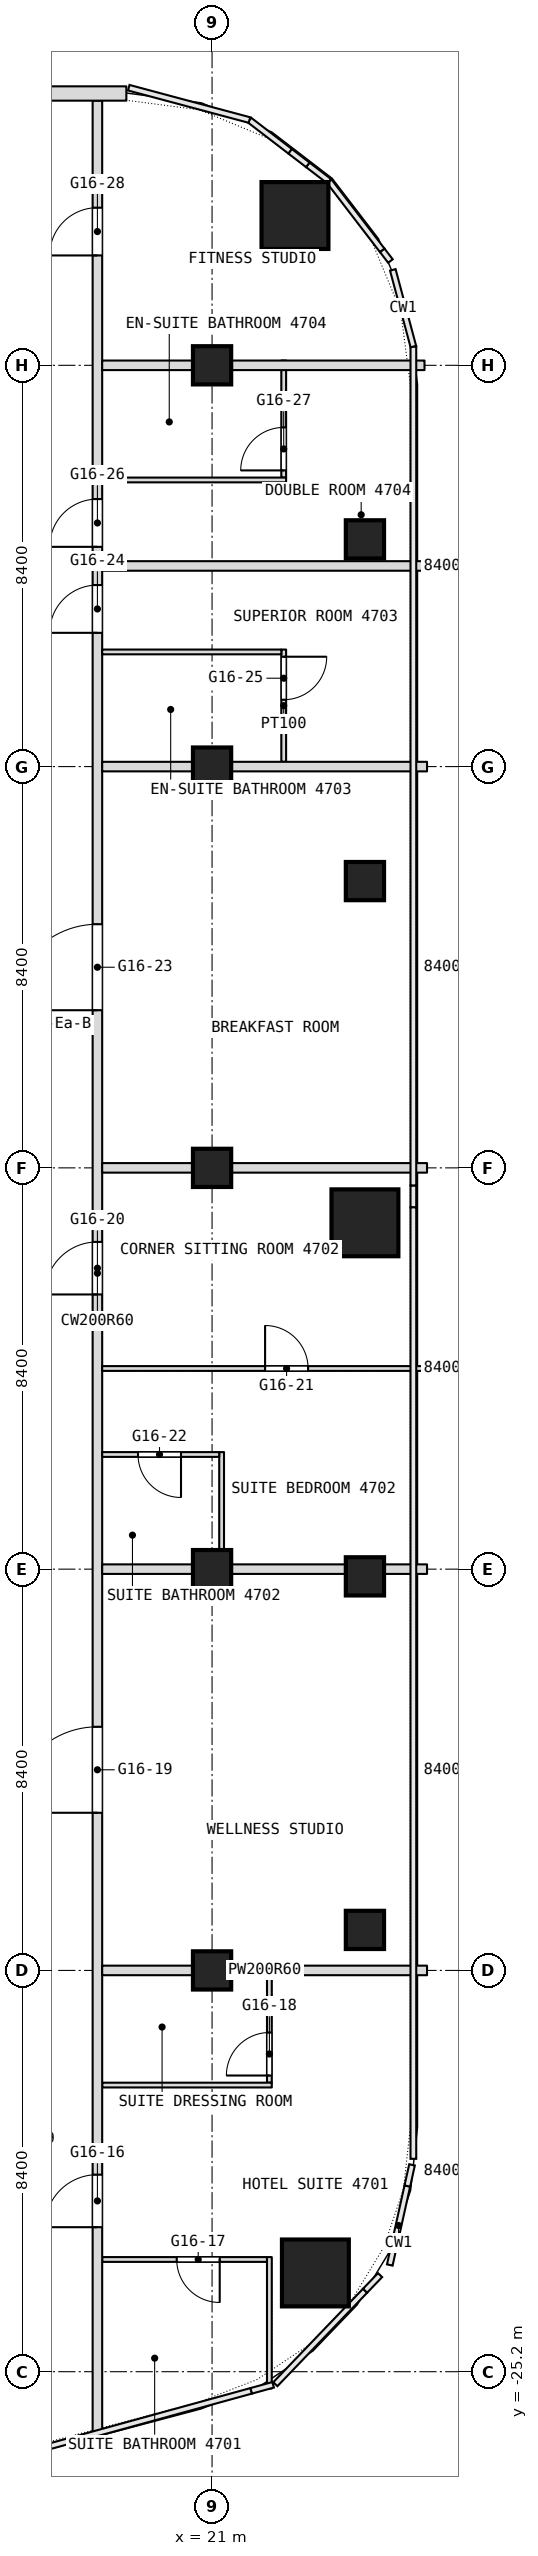
"""IFC4 building model, lengths in metres.
Left out: names, types, materials, properties, quantities, classifications, styles, units other than length and angle.
Written with IfcOpenShell. Run it as: python <this file> out.ifc"""

import sys

from ifc_helpers import new_model, si_unit, direction, frame, frame_2d, origin, origin_2d, place, context, subcontext, project, spatial, rectangle, extrude, element, fill, save


model = new_model("IFC4")
c1 = context("Model", 3, precision=1e-05, world=origin(), true_north=direction((0.0, 1.0)))
c2 = subcontext(c1, "Body", "Model", "MODEL_VIEW")
j1 = project(units=[si_unit("LENGTHUNIT", "METRE"), si_unit("PLANEANGLEUNIT", "RADIAN")], contexts=[c1])
p1 = place(None, origin())
s1 = spatial("IfcSite", under=j1, at=p1, CompositionType="ELEMENT")
p2 = place(p1, origin())
s2 = spatial("IfcBuilding", under=s1, at=p2, CompositionType="ELEMENT")
p3 = place(p2, frame((0.0, 0.0, 205.7)))
s3 = spatial("IfcBuildingStorey", under=s2, at=p3, CompositionType="ELEMENT", Elevation=205.7)
for number, where, z_axis, x_axis in (
    (1, (23.163, -23.133, 0.0), (0.0, 0.0, 1.0), (1.0, 0.0, 0.0)),
    (2, (24.2, -1.15, 0.0), (0.0, 0.0, 1.0), (1.0, 0.0, 0.0)),
    (3, (22.736, 19.936, 0.0), (0.0, 0.0, 1.0), (1.0, 0.0, 0.0)),
):
    element("IfcColumn", number, at=place(p3, frame(where, z_axis=z_axis, x_axis=x_axis)), inside=s3, PredefinedType="COLUMN", context=c2, shape_type="SweptSolid", body=[
        extrude(rectangle(XDim=1.4, YDim=1.4, at=origin_2d()), origin(), (0.0, 0.0, 1.0), 3.6),
    ])
for number, where, z_axis, x_axis in (
    (4, (21.0, -16.8, 0.0), (0.0, 0.0, 1.0), (1.0, 0.0, 0.0)),
    (5, (21.0, -8.4, 0.0), (0.0, 0.0, 1.0), (1.0, 0.0, 0.0)),
    (6, (21.0, 0.0, 0.0), (0.0, 0.0, 1.0), (1.0, 0.0, 0.0)),
    (7, (21.0, 8.4, 0.0), (0.0, 0.0, 1.0), (1.0, 0.0, 0.0)),
    (8, (21.0, 16.8, 0.0), (0.0, 0.0, 1.0), (1.0, 0.0, 0.0)),
    (9, (24.2, 13.156, 0.0), (0.0, 0.0, 1.0), (1.0, 0.0, 0.0)),
    (10, (24.2, 6.003, 0.0), (0.0, 0.0, 1.0), (1.0, 0.0, 0.0)),
    (11, (24.2, -8.551, 0.0), (0.0, 0.0, 1.0), (1.0, 0.0, 0.0)),
    (12, (24.2, -15.952, 0.0), (0.0, 0.0, 1.0), (1.0, 0.0, 0.0)),
):
    element("IfcColumn", number, at=place(p3, frame(where, z_axis=z_axis, x_axis=x_axis)), inside=s3, PredefinedType="COLUMN", context=c2, shape_type="SweptSolid", body=[
        extrude(rectangle(XDim=0.8, YDim=0.8, at=origin_2d()), origin(), (0.0, 0.0, 1.0), 3.6),
    ])
p4 = place(p3, frame((18.7, -22.851, 0.0), z_axis=(0.0, 0.0, 1.0), x_axis=(1.0, 0.0, 0.0)))
e13 = element("IfcWall", 13, at=p4, inside=s3, PredefinedType="PARTITIONING", context=c2, shape_type="SweptSolid", body=[
    extrude(rectangle(XDim=3.45, YDim=0.1, at=frame_2d((1.725, 0.0))), origin(), (0.0, 0.0, 1.0), 3.34),
])
p5 = place(p4, frame((1.56, 0.0, 0.0)))
e14 = element("IfcOpeningElement", 14, at=p5, cuts=e13, PredefinedType="OPENING", context=c2, shape_type="SweptSolid", body=[
    extrude(rectangle(XDim=0.9, YDim=2.1, at=frame_2d((0.45, 1.05))), frame((0.0, 0.05, 0.0), z_axis=(0.0, -1.0, 0.0), x_axis=(1.0, 0.0, 0.0)), (0.0, 0.0, 1.0), 0.1),
])
p6 = place(p3, frame((22.5, 8.5, 0.0), z_axis=(0.0, 0.0, 1.0), x_axis=(0.0, 1.0, 0.0)))
e15 = element("IfcWall", 15, at=p6, inside=s3, PredefinedType="PARTITIONING", context=c2, shape_type="SweptSolid", body=[
    extrude(rectangle(XDim=2.35, YDim=0.1, at=frame_2d((1.175, 0.0))), origin(), (0.0, 0.0, 1.0), 3.34),
])
p7 = place(p6, frame((1.3, 0.0, 0.0)))
e16 = element("IfcOpeningElement", 16, at=p7, cuts=e15, PredefinedType="OPENING", context=c2, shape_type="SweptSolid", body=[
    extrude(rectangle(XDim=0.9, YDim=2.1, at=frame_2d((0.45, 1.05))), frame((0.0, 0.05, 0.0), z_axis=(0.0, -1.0, 0.0), x_axis=(1.0, 0.0, 0.0)), (0.0, 0.0, 1.0), 0.1),
])
p8 = place(p3, frame((22.5, 14.45, 0.0), z_axis=(0.0, 0.0, 1.0), x_axis=(0.0, 1.0, 0.0)))
e17 = element("IfcWall", 17, at=p8, inside=s3, PredefinedType="PARTITIONING", context=c2, shape_type="SweptSolid", body=[
    extrude(rectangle(XDim=2.45, YDim=0.1, at=frame_2d((1.225, 0.0))), origin(), (0.0, 0.0, 1.0), 3.34),
])
p9 = place(p8, frame((0.15, 0.0, 0.0)))
e18 = element("IfcOpeningElement", 18, at=p9, cuts=e17, PredefinedType="OPENING", context=c2, shape_type="SweptSolid", body=[
    extrude(rectangle(XDim=0.9, YDim=2.1, at=frame_2d((0.45, 1.05))), frame((0.0, 0.05, 0.0), z_axis=(0.0, -1.0, 0.0), x_axis=(1.0, 0.0, 0.0)), (0.0, 0.0, 1.0), 0.1),
])
p10 = place(p3, frame((22.2, -25.552, 0.0), z_axis=(0.0, 0.0, 1.0), x_axis=(0.0, 1.0, 0.0)))
e19 = element("IfcWall", 19, at=p10, inside=s3, PredefinedType="PARTITIONING", context=c2, shape_type="SweptSolid", body=[
    extrude(rectangle(XDim=2.751, YDim=0.1, at=frame_2d((1.375, 0.0))), origin(), (0.0, 0.0, 1.0), 3.34),
])
p11 = place(p3, frame((22.2, -19.15, 0.0), z_axis=(0.0, 0.0, 1.0), x_axis=(0.0, 1.0, 0.0)))
e20 = element("IfcWall", 20, at=p11, inside=s3, PredefinedType="PARTITIONING", context=c2, shape_type="SweptSolid", body=[
    extrude(rectangle(XDim=2.45, YDim=0.1, at=frame_2d((1.225, 0.0))), origin(), (0.0, 0.0, 1.0), 3.34),
])
p12 = place(p11, frame((0.15, 0.0, 0.0)))
e21 = element("IfcOpeningElement", 21, at=p12, cuts=e20, PredefinedType="OPENING", context=c2, shape_type="SweptSolid", body=[
    extrude(rectangle(XDim=0.9, YDim=2.1, at=frame_2d((0.45, 1.05))), frame((0.0, 0.05, 0.0), z_axis=(0.0, -1.0, 0.0), x_axis=(1.0, 0.0, 0.0)), (0.0, 0.0, 1.0), 0.1),
])
p13 = place(p3, frame((21.2, -8.3, 0.0), z_axis=(0.0, 0.0, 1.0), x_axis=(0.0, 1.0, 0.0)))
e22 = element("IfcWall", 22, at=p13, inside=s3, PredefinedType="PARTITIONING", context=c2, shape_type="SweptSolid", body=[
    extrude(rectangle(XDim=2.35, YDim=0.1, at=frame_2d((1.175, 0.0))), origin(), (0.0, 0.0, 1.0), 3.34),
])
p14 = place(p3, frame((18.7, -19.2, 0.0), z_axis=(0.0, 0.0, 1.0), x_axis=(1.0, 0.0, 0.0)))
e23 = element("IfcWall", 23, at=p14, inside=s3, PredefinedType="PARTITIONING", context=c2, shape_type="SweptSolid", body=[
    extrude(rectangle(XDim=3.55, YDim=0.1, at=frame_2d((1.775, 0.0))), origin(), (0.0, 0.0, 1.0), 3.34),
])
p15 = place(p3, frame((18.6, -26.751, 0.0), z_axis=(0.0, 0.0, 1.0), x_axis=(0.0, 1.0, 0.0)))
e24 = element("IfcWall", 24, at=p15, inside=s3, PredefinedType="PARTITIONING", context=c2, shape_type="SweptSolid", body=[
    extrude(rectangle(XDim=49.091, YDim=0.2, at=frame_2d((24.545, 0.0))), origin(), (0.0, 0.0, 1.0), 3.34),
])
p16 = place(p15, frame((4.576, 0.0, 0.0)))
e25 = element("IfcOpeningElement", 25, at=p16, cuts=e24, PredefinedType="OPENING", context=c2, shape_type="SweptSolid", body=[
    extrude(rectangle(XDim=1.1, YDim=2.1, at=frame_2d((0.55, 1.05))), frame((0.0, 0.1, 0.0), z_axis=(0.0, -1.0, 0.0), x_axis=(1.0, 0.0, 0.0)), (0.0, 0.0, 1.0), 0.2),
])
p17 = place(p15, frame((13.251, 0.0, 0.0)))
e26 = element("IfcOpeningElement", 26, at=p17, cuts=e24, PredefinedType="OPENING", context=c2, shape_type="SweptSolid", body=[
    extrude(rectangle(XDim=1.8, YDim=2.1, at=frame_2d((0.9, 1.05))), frame((0.0, 0.1, 0.0), z_axis=(0.0, -1.0, 0.0), x_axis=(1.0, 0.0, 0.0)), (0.0, 0.0, 1.0), 0.2),
])
p18 = place(p15, frame((24.101, 0.0, 0.0)))
e27 = element("IfcOpeningElement", 27, at=p18, cuts=e24, PredefinedType="OPENING", context=c2, shape_type="SweptSolid", body=[
    extrude(rectangle(XDim=1.1, YDim=2.1, at=frame_2d((0.55, 1.05))), frame((0.0, 0.1, 0.0), z_axis=(0.0, -1.0, 0.0), x_axis=(1.0, 0.0, 0.0)), (0.0, 0.0, 1.0), 0.2),
])
p19 = place(p15, frame((30.051, 0.0, 0.0)))
e28 = element("IfcOpeningElement", 28, at=p19, cuts=e24, PredefinedType="OPENING", context=c2, shape_type="SweptSolid", body=[
    extrude(rectangle(XDim=1.8, YDim=2.1, at=frame_2d((0.9, 1.05))), frame((0.0, 0.1, 0.0), z_axis=(0.0, -1.0, 0.0), x_axis=(1.0, 0.0, 0.0)), (0.0, 0.0, 1.0), 0.2),
])
p20 = place(p15, frame((37.951, 0.0, 0.0)))
e29 = element("IfcOpeningElement", 29, at=p20, cuts=e24, PredefinedType="OPENING", context=c2, shape_type="SweptSolid", body=[
    extrude(rectangle(XDim=1.0, YDim=2.1, at=frame_2d((0.5, 1.05))), frame((0.0, 0.1, 0.0), z_axis=(0.0, -1.0, 0.0), x_axis=(1.0, 0.0, 0.0)), (0.0, 0.0, 1.0), 0.2),
])
p21 = place(p15, frame((39.751, 0.0, 0.0)))
e30 = element("IfcOpeningElement", 30, at=p21, cuts=e24, PredefinedType="OPENING", context=c2, shape_type="SweptSolid", body=[
    extrude(rectangle(XDim=1.0, YDim=2.1, at=frame_2d((0.5, 1.05))), frame((0.0, 0.1, 0.0), z_axis=(0.0, -1.0, 0.0), x_axis=(1.0, 0.0, 0.0)), (0.0, 0.0, 1.0), 0.2),
])
p22 = place(p15, frame((45.851, 0.0, 0.0)))
e31 = element("IfcOpeningElement", 31, at=p22, cuts=e24, PredefinedType="OPENING", context=c2, shape_type="SweptSolid", body=[
    extrude(rectangle(XDim=1.0, YDim=2.1, at=frame_2d((0.5, 1.05))), frame((0.0, 0.1, 0.0), z_axis=(0.0, -1.0, 0.0), x_axis=(1.0, 0.0, 0.0)), (0.0, 0.0, 1.0), 0.2),
])
for number, where, z_axis, x_axis in (
    (32, (18.7, -16.8, 0.0), (0.0, 0.0, 1.0), (1.0, 0.0, 0.0)),
    (33, (18.7, -8.4, 0.0), (0.0, 0.0, 1.0), (1.0, 0.0, 0.0)),
):
    element("IfcWall", number, at=place(p3, frame(where, z_axis=z_axis, x_axis=x_axis)), inside=s3, PredefinedType="PARTITIONING", context=c2, shape_type="SweptSolid", body=[
        extrude(rectangle(XDim=6.8, YDim=0.2, at=frame_2d((3.4, 0.0))), origin(), (0.0, 0.0, 1.0), 2.94),
    ])
p23 = place(p3, frame((18.7, -6.0, 0.0), z_axis=(0.0, 0.0, 1.0), x_axis=(1.0, 0.0, 0.0)))
e34 = element("IfcWall", 34, at=p23, inside=s3, PredefinedType="PARTITIONING", context=c2, shape_type="SweptSolid", body=[
    extrude(rectangle(XDim=2.45, YDim=0.1, at=frame_2d((1.225, 0.0))), origin(), (0.0, 0.0, 1.0), 3.34),
])
p24 = place(p23, frame((0.75, 0.0, 0.0)))
e35 = element("IfcOpeningElement", 35, at=p24, cuts=e34, PredefinedType="OPENING", context=c2, shape_type="SweptSolid", body=[
    extrude(rectangle(XDim=0.9, YDim=2.1, at=frame_2d((0.45, 1.05))), frame((0.0, 0.05, 0.0), z_axis=(0.0, -1.0, 0.0), x_axis=(1.0, 0.0, 0.0)), (0.0, 0.0, 1.0), 0.1),
])
p25 = place(p3, frame((18.7, -4.2, 0.0), z_axis=(0.0, 0.0, 1.0), x_axis=(1.0, 0.0, 0.0)))
e36 = element("IfcWall", 36, at=p25, inside=s3, PredefinedType="PARTITIONING", context=c2, shape_type="SweptSolid", body=[
    extrude(rectangle(XDim=6.8, YDim=0.1, at=frame_2d((3.4, 0.0))), origin(), (0.0, 0.0, 1.0), 3.34),
])
p26 = place(p25, frame((3.41, 0.0, 0.0)))
e37 = element("IfcOpeningElement", 37, at=p26, cuts=e36, PredefinedType="OPENING", context=c2, shape_type="SweptSolid", body=[
    extrude(rectangle(XDim=0.9, YDim=2.1, at=frame_2d((0.45, 1.05))), frame((0.0, 0.05, 0.0), z_axis=(0.0, -1.0, 0.0), x_axis=(1.0, 0.0, 0.0)), (0.0, 0.0, 1.0), 0.1),
])
for number, where, z_axis, x_axis in (
    (38, (18.7, 0.0, 0.0), (0.0, 0.0, 1.0), (1.0, 0.0, 0.0)),
    (39, (18.7, 8.4, 0.0), (0.0, 0.0, 1.0), (1.0, 0.0, 0.0)),
):
    element("IfcWall", number, at=place(p3, frame(where, z_axis=z_axis, x_axis=x_axis)), inside=s3, PredefinedType="PARTITIONING", context=c2, shape_type="SweptSolid", body=[
        extrude(rectangle(XDim=6.8, YDim=0.2, at=frame_2d((3.4, 0.0))), origin(), (0.0, 0.0, 1.0), 2.94),
    ])
p27 = place(p3, frame((18.7, 10.8, 0.0), z_axis=(0.0, 0.0, 1.0), x_axis=(1.0, 0.0, 0.0)))
e40 = element("IfcWall", 40, at=p27, inside=s3, PredefinedType="PARTITIONING", context=c2, shape_type="SweptSolid", body=[
    extrude(rectangle(XDim=3.75, YDim=0.1, at=frame_2d((1.875, 0.0))), origin(), (0.0, 0.0, 1.0), 3.34),
])
p28 = place(p3, frame((18.7, 12.6, 0.0), z_axis=(0.0, 0.0, 1.0), x_axis=(1.0, 0.0, 0.0)))
e41 = element("IfcWall", 41, at=p28, inside=s3, PredefinedType="PARTITIONING", context=c2, shape_type="SweptSolid", body=[
    extrude(rectangle(XDim=6.8, YDim=0.2, at=frame_2d((3.4, 0.0))), origin(), (0.0, 0.0, 1.0), 3.34),
])
p29 = place(p3, frame((18.7, 14.4, 0.0), z_axis=(0.0, 0.0, 1.0), x_axis=(1.0, 0.0, 0.0)))
e42 = element("IfcWall", 42, at=p29, inside=s3, PredefinedType="PARTITIONING", context=c2, shape_type="SweptSolid", body=[
    extrude(rectangle(XDim=3.85, YDim=0.1, at=frame_2d((1.925, 0.0))), origin(), (0.0, 0.0, 1.0), 3.34),
])
p30 = place(p3, frame((18.7, 16.8, 0.0), z_axis=(0.0, 0.0, 1.0), x_axis=(1.0, 0.0, 0.0)))
e43 = element("IfcWall", 43, at=p30, inside=s3, PredefinedType="PARTITIONING", context=c2, shape_type="SweptSolid", body=[
    extrude(rectangle(XDim=6.747, YDim=0.2, at=frame_2d((3.374, 0.0))), origin(), (0.0, 0.0, 1.0), 2.94),
])
p31 = place(p3, frame((19.206, 22.49, 0.0), z_axis=(0.0, 0.0, 1.0), x_axis=(-1.0, 0.0, 0.0)))
e44 = element("IfcWall", 44, at=p31, inside=s3, PredefinedType="NOTDEFINED", context=c2, shape_type="SweptSolid", body=[
    extrude(rectangle(XDim=38.412, YDim=0.3, at=frame_2d((19.206, 0.0))), origin(), (0.0, 0.0, 1.0), 3.6),
])
p32 = place(p31, frame((3.306, 0.0, 0.9)))
e45 = element("IfcOpeningElement", 45, at=p32, cuts=e44, PredefinedType="OPENING", context=c2, shape_type="SweptSolid", body=[
    extrude(rectangle(XDim=2.4, YDim=2.1, at=frame_2d((1.2, 1.05))), frame((0.0, 0.15, 0.0), z_axis=(0.0, -1.0, 0.0), x_axis=(1.0, 0.0, 0.0)), (0.0, 0.0, 1.0), 0.3),
])
p33 = place(p31, frame((7.506, 0.0, 0.9)))
e46 = element("IfcOpeningElement", 46, at=p33, cuts=e44, PredefinedType="OPENING", context=c2, shape_type="SweptSolid", body=[
    extrude(rectangle(XDim=2.4, YDim=2.1, at=frame_2d((1.2, 1.05))), frame((0.0, 0.15, 0.0), z_axis=(0.0, -1.0, 0.0), x_axis=(1.0, 0.0, 0.0)), (0.0, 0.0, 1.0), 0.3),
])
p34 = place(p31, frame((11.706, 0.0, 0.9)))
e47 = element("IfcOpeningElement", 47, at=p34, cuts=e44, PredefinedType="OPENING", context=c2, shape_type="SweptSolid", body=[
    extrude(rectangle(XDim=2.4, YDim=2.1, at=frame_2d((1.2, 1.05))), frame((0.0, 0.15, 0.0), z_axis=(0.0, -1.0, 0.0), x_axis=(1.0, 0.0, 0.0)), (0.0, 0.0, 1.0), 0.3),
])
p35 = place(p31, frame((15.906, 0.0, 0.9)))
e48 = element("IfcOpeningElement", 48, at=p35, cuts=e44, PredefinedType="OPENING", context=c2, shape_type="SweptSolid", body=[
    extrude(rectangle(XDim=2.4, YDim=2.1, at=frame_2d((1.2, 1.05))), frame((0.0, 0.15, 0.0), z_axis=(0.0, -1.0, 0.0), x_axis=(1.0, 0.0, 0.0)), (0.0, 0.0, 1.0), 0.3),
])
p36 = place(p31, frame((20.106, 0.0, 0.9)))
e49 = element("IfcOpeningElement", 49, at=p36, cuts=e44, PredefinedType="OPENING", context=c2, shape_type="SweptSolid", body=[
    extrude(rectangle(XDim=2.4, YDim=2.1, at=frame_2d((1.2, 1.05))), frame((0.0, 0.15, 0.0), z_axis=(0.0, -1.0, 0.0), x_axis=(1.0, 0.0, 0.0)), (0.0, 0.0, 1.0), 0.3),
])
p37 = place(p31, frame((24.306, 0.0, 0.9)))
e50 = element("IfcOpeningElement", 50, at=p37, cuts=e44, PredefinedType="OPENING", context=c2, shape_type="SweptSolid", body=[
    extrude(rectangle(XDim=2.4, YDim=2.1, at=frame_2d((1.2, 1.05))), frame((0.0, 0.15, 0.0), z_axis=(0.0, -1.0, 0.0), x_axis=(1.0, 0.0, 0.0)), (0.0, 0.0, 1.0), 0.3),
])
p38 = place(p31, frame((28.506, 0.0, 0.9)))
e51 = element("IfcOpeningElement", 51, at=p38, cuts=e44, PredefinedType="OPENING", context=c2, shape_type="SweptSolid", body=[
    extrude(rectangle(XDim=2.4, YDim=2.1, at=frame_2d((1.2, 1.05))), frame((0.0, 0.15, 0.0), z_axis=(0.0, -1.0, 0.0), x_axis=(1.0, 0.0, 0.0)), (0.0, 0.0, 1.0), 0.3),
])
p39 = place(p31, frame((32.706, 0.0, 0.9)))
e52 = element("IfcOpeningElement", 52, at=p39, cuts=e44, PredefinedType="OPENING", context=c2, shape_type="SweptSolid", body=[
    extrude(rectangle(XDim=2.4, YDim=2.1, at=frame_2d((1.2, 1.05))), frame((0.0, 0.15, 0.0), z_axis=(0.0, -1.0, 0.0), x_axis=(1.0, 0.0, 0.0)), (0.0, 0.0, 1.0), 0.3),
])
p40 = place(p5, origin())
e53 = element("IfcDoor", 53, at=p40, inside=s3, OperationType="SINGLE_SWING_LEFT", PredefinedType="DOOR", context=c2, shape_type="SweptSolid", body=[
    extrude(rectangle(XDim=0.9, YDim=2.1, at=frame_2d((0.45, 1.05))), frame((0.0, 0.025, 0.0), z_axis=(0.0, -1.0, 0.0), x_axis=(1.0, 0.0, 0.0)), (0.0, 0.0, 1.0), 0.05),
])
fill(e14, e53)
p41 = place(p7, origin())
e54 = element("IfcDoor", 54, at=p41, inside=s3, OperationType="SINGLE_SWING_RIGHT", PredefinedType="DOOR", context=c2, shape_type="SweptSolid", body=[
    extrude(rectangle(XDim=0.9, YDim=2.1, at=frame_2d((0.45, 1.05))), frame((0.0, 0.025, 0.0), z_axis=(0.0, -1.0, 0.0), x_axis=(1.0, 0.0, 0.0)), (0.0, 0.0, 1.0), 0.05),
])
fill(e16, e54)
p42 = place(p9, origin())
e55 = element("IfcDoor", 55, at=p42, inside=s3, OperationType="SINGLE_SWING_LEFT", PredefinedType="DOOR", context=c2, shape_type="SweptSolid", body=[
    extrude(rectangle(XDim=0.9, YDim=2.1, at=frame_2d((0.45, 1.05))), frame((0.0, 0.025, 0.0), z_axis=(0.0, -1.0, 0.0), x_axis=(1.0, 0.0, 0.0)), (0.0, 0.0, 1.0), 0.05),
])
fill(e18, e55)
p43 = place(p12, origin())
e56 = element("IfcDoor", 56, at=p43, inside=s3, OperationType="SINGLE_SWING_LEFT", PredefinedType="DOOR", context=c2, shape_type="SweptSolid", body=[
    extrude(rectangle(XDim=0.9, YDim=2.1, at=frame_2d((0.45, 1.05))), frame((0.0, 0.025, 0.0), z_axis=(0.0, -1.0, 0.0), x_axis=(1.0, 0.0, 0.0)), (0.0, 0.0, 1.0), 0.05),
])
fill(e21, e56)
p44 = place(p16, origin())
e57 = element("IfcDoor", 57, at=p44, inside=s3, OperationType="SINGLE_SWING_RIGHT", PredefinedType="DOOR", context=c2, shape_type="SweptSolid", body=[
    extrude(rectangle(XDim=1.1, YDim=2.1, at=frame_2d((0.55, 1.05))), frame((0.0, 0.025, 0.0), z_axis=(0.0, -1.0, 0.0), x_axis=(1.0, 0.0, 0.0)), (0.0, 0.0, 1.0), 0.05),
])
fill(e25, e57)
p45 = place(p17, origin())
e58 = element("IfcDoor", 58, at=p45, inside=s3, OperationType="DOUBLE_DOOR_SINGLE_SWING", PredefinedType="DOOR", context=c2, shape_type="SweptSolid", body=[
    extrude(rectangle(XDim=1.8, YDim=2.1, at=frame_2d((0.9, 1.05))), frame((0.0, 0.025, 0.0), z_axis=(0.0, -1.0, 0.0), x_axis=(1.0, 0.0, 0.0)), (0.0, 0.0, 1.0), 0.05),
])
fill(e26, e58)
p46 = place(p18, origin())
e59 = element("IfcDoor", 59, at=p46, inside=s3, OperationType="SINGLE_SWING_RIGHT", PredefinedType="DOOR", context=c2, shape_type="SweptSolid", body=[
    extrude(rectangle(XDim=1.1, YDim=2.1, at=frame_2d((0.55, 1.05))), frame((0.0, 0.025, 0.0), z_axis=(0.0, -1.0, 0.0), x_axis=(1.0, 0.0, 0.0)), (0.0, 0.0, 1.0), 0.05),
])
fill(e27, e59)
p47 = place(p19, origin())
e60 = element("IfcDoor", 60, at=p47, inside=s3, OperationType="DOUBLE_DOOR_SINGLE_SWING", PredefinedType="DOOR", context=c2, shape_type="SweptSolid", body=[
    extrude(rectangle(XDim=1.8, YDim=2.1, at=frame_2d((0.9, 1.05))), frame((0.0, 0.025, 0.0), z_axis=(0.0, -1.0, 0.0), x_axis=(1.0, 0.0, 0.0)), (0.0, 0.0, 1.0), 0.05),
])
fill(e28, e60)
p48 = place(p20, origin())
e61 = element("IfcDoor", 61, at=p48, inside=s3, OperationType="SINGLE_SWING_RIGHT", PredefinedType="DOOR", context=c2, shape_type="SweptSolid", body=[
    extrude(rectangle(XDim=1.0, YDim=2.1, at=frame_2d((0.5, 1.05))), frame((0.0, 0.025, 0.0), z_axis=(0.0, -1.0, 0.0), x_axis=(1.0, 0.0, 0.0)), (0.0, 0.0, 1.0), 0.05),
])
fill(e29, e61)
p49 = place(p21, origin())
e62 = element("IfcDoor", 62, at=p49, inside=s3, OperationType="SINGLE_SWING_RIGHT", PredefinedType="DOOR", context=c2, shape_type="SweptSolid", body=[
    extrude(rectangle(XDim=1.0, YDim=2.1, at=frame_2d((0.5, 1.05))), frame((0.0, 0.025, 0.0), z_axis=(0.0, -1.0, 0.0), x_axis=(1.0, 0.0, 0.0)), (0.0, 0.0, 1.0), 0.05),
])
fill(e30, e62)
p50 = place(p22, origin())
e63 = element("IfcDoor", 63, at=p50, inside=s3, OperationType="SINGLE_SWING_LEFT", PredefinedType="DOOR", context=c2, shape_type="SweptSolid", body=[
    extrude(rectangle(XDim=1.0, YDim=2.1, at=frame_2d((0.5, 1.05))), frame((0.0, 0.025, 0.0), z_axis=(0.0, -1.0, 0.0), x_axis=(1.0, 0.0, 0.0)), (0.0, 0.0, 1.0), 0.05),
])
fill(e31, e63)
p51 = place(p24, origin())
e64 = element("IfcDoor", 64, at=p51, inside=s3, OperationType="SINGLE_SWING_RIGHT", PredefinedType="DOOR", context=c2, shape_type="SweptSolid", body=[
    extrude(rectangle(XDim=0.9, YDim=2.1, at=frame_2d((0.45, 1.05))), frame((0.0, 0.025, 0.0), z_axis=(0.0, -1.0, 0.0), x_axis=(1.0, 0.0, 0.0)), (0.0, 0.0, 1.0), 0.05),
])
fill(e35, e64)
p52 = place(p26, origin())
e65 = element("IfcDoor", 65, at=p52, inside=s3, OperationType="SINGLE_SWING_RIGHT", PredefinedType="DOOR", context=c2, shape_type="SweptSolid", body=[
    extrude(rectangle(XDim=0.9, YDim=2.1, at=frame_2d((0.45, 1.05))), frame((0.0, 0.025, 0.0), z_axis=(0.0, -1.0, 0.0), x_axis=(1.0, 0.0, 0.0)), (0.0, 0.0, 1.0), 0.05),
])
fill(e37, e65)
save(model, sys.argv[1])
